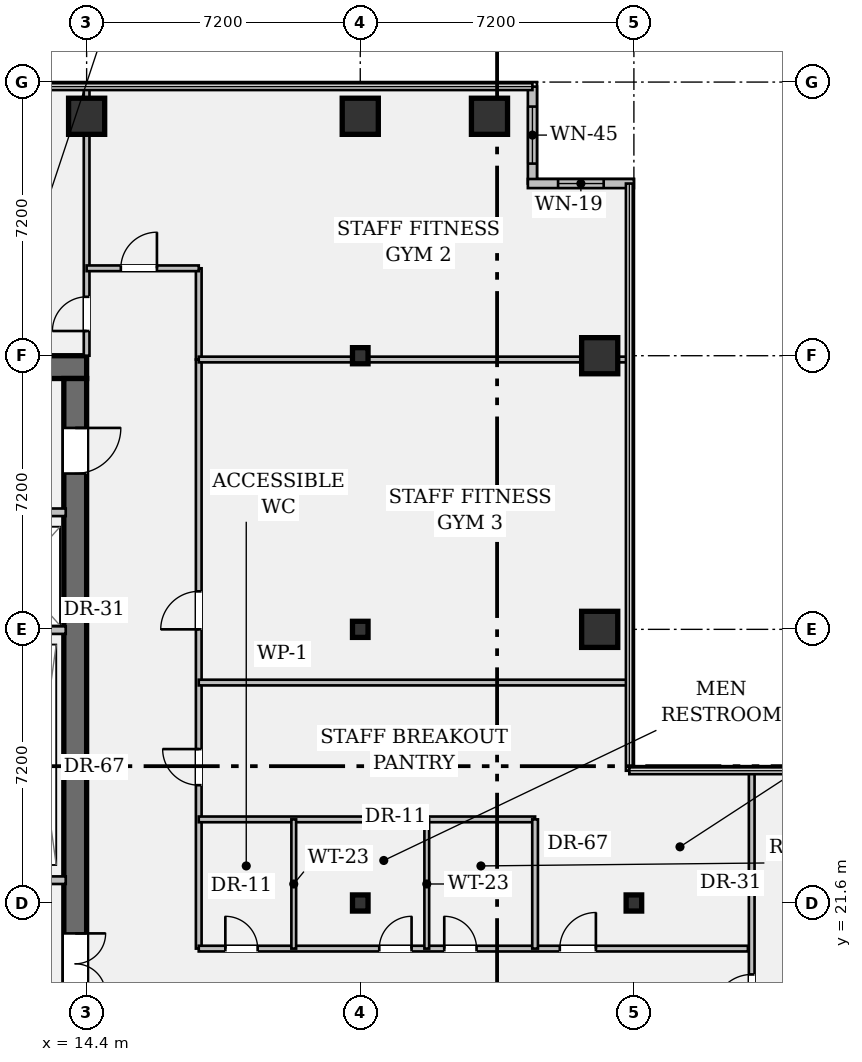
"""IFC4 building model, lengths in metres.
Left out: names, types, materials, properties, quantities, classifications, styles, units other than length and angle.
Written with IfcOpenShell. Run it as: python <this file> out.ifc"""

import sys

from ifc_helpers import new_model, si_unit, direction, frame, frame_2d, origin, origin_2d, place, context, subcontext, project, spatial, rectangle, hollow_rectangle, i_section, extrude, element, fill, save


model = new_model("IFC4")
c1 = context("Model", 3, precision=1e-05, world=origin(), true_north=direction((0.0, 1.0)))
c2 = subcontext(c1, "Body", "Model", "MODEL_VIEW")
j1 = project(units=[si_unit("LENGTHUNIT", "METRE"), si_unit("PLANEANGLEUNIT", "RADIAN")], contexts=[c1])
p1 = place(None, origin())
s1 = spatial("IfcSite", under=j1, at=p1, CompositionType="ELEMENT")
p2 = place(p1, origin())
s2 = spatial("IfcBuilding", under=s1, at=p2, CompositionType="ELEMENT")
p3 = place(p2, frame((0.0, 0.0, 81.2)))
s3 = spatial("IfcBuildingStorey", under=s2, at=p3, CompositionType="ELEMENT", Elevation=81.2)
p4 = place(p3, frame((0.6, 35.7, 0.0), z_axis=(0.0, 0.0, 1.0), x_axis=(1.0, 0.0, 0.0)))
e1 = element("IfcWall", 1, at=p4, inside=s3, PredefinedType="SHEAR", context=c2, shape_type="SweptSolid", body=[
    extrude(rectangle(XDim=13.8, YDim=0.6, at=frame_2d((6.9, 0.0))), origin(), (0.0, 0.0, 1.0), 3.57),
])
p5 = place(p3, frame((14.1, 35.4, 0.0), z_axis=(0.0, 0.0, 1.0), x_axis=(0.0, -1.0, 0.0)))
e2 = element("IfcWall", 2, at=p5, inside=s3, PredefinedType="SHEAR", context=c2, shape_type="SweptSolid", body=[
    extrude(rectangle(XDim=27.6, YDim=0.6, at=frame_2d((13.8, 0.0))), origin(), (0.0, 0.0, 1.0), 3.57),
])
p6 = place(p5, frame((1.3, 0.0, 0.0)))
e3 = element("IfcOpeningElement", 3, at=p6, cuts=e2, PredefinedType="OPENING", context=c2, shape_type="SweptSolid", body=[
    extrude(rectangle(XDim=1.2, YDim=2.15, at=frame_2d((0.6, 1.075))), frame((0.0, 0.312, 0.0), z_axis=(0.0, -1.0, 0.0), x_axis=(1.0, 0.0, 0.0)), (0.0, 0.0, 1.0), 0.624),
])
p7 = place(p5, frame((25.25, 0.0, 0.0)))
e4 = element("IfcOpeningElement", 4, at=p7, cuts=e2, PredefinedType="OPENING", context=c2, shape_type="SweptSolid", body=[
    extrude(rectangle(XDim=1.2, YDim=2.15, at=frame_2d((0.6, 1.075))), frame((0.0, 0.312, 0.0), z_axis=(0.0, -1.0, 0.0), x_axis=(1.0, 0.0, 0.0)), (0.0, 0.0, 1.0), 0.624),
])
p8 = place(p5, frame((14.6, 0.0, 0.0)))
e5 = element("IfcOpeningElement", 5, at=p8, cuts=e2, PredefinedType="OPENING", context=c2, shape_type="SweptSolid", body=[
    extrude(rectangle(XDim=1.6, YDim=2.2, at=frame_2d((0.8, 1.1))), frame((0.0, 0.312, 0.0), z_axis=(0.0, -1.0, 0.0), x_axis=(1.0, 0.0, 0.0)), (0.0, 0.0, 1.0), 0.624),
])
p9 = place(p3, frame((14.4, 42.3, 0.0), z_axis=(0.0, 0.0, 1.0), x_axis=(1.0, 0.0, 0.0)))
e6 = element("IfcColumn", 6, at=p9, inside=s3, PredefinedType="COLUMN", context=c2, shape_type="SweptSolid", body=[
    extrude(hollow_rectangle(XDim=0.95, YDim=0.95, WallThickness=0.06, at=origin_2d()), origin(), (0.0, 0.0, 1.0), 3.57),
])
for number, where, z_axis, x_axis in (
    (7, (21.6, 21.6, 0.0), (0.0, 0.0, 1.0), (1.0, 0.0, 0.0)),
    (8, (21.6, 28.8, 0.0), (0.0, 0.0, 1.0), (1.0, 0.0, 0.0)),
    (9, (21.6, 36.0, 0.0), (0.0, 0.0, 1.0), (1.0, 0.0, 0.0)),
):
    element("IfcColumn", number, at=place(p3, frame(where, z_axis=z_axis, x_axis=x_axis)), inside=s3, PredefinedType="COLUMN", context=c2, shape_type="SweptSolid", body=[
        extrude(i_section(OverallWidth=0.409, OverallDepth=0.424, WebThickness=0.033, FlangeThickness=0.052, FilletRadius=0.018, at=origin_2d()), origin(), (0.0, 0.0, 1.0), 3.57),
    ])
for number, where, z_axis, x_axis in (
    (10, (21.6, 42.3, 0.0), (0.0, 0.0, 1.0), (1.0, 0.0, 0.0)),
    (11, (25.0, 42.3, 0.0), (0.0, 0.0, 1.0), (1.0, 0.0, 0.0)),
    (12, (27.9, 28.8, 0.0), (0.0, 0.0, 1.0), (1.0, 0.0, 0.0)),
    (13, (27.9, 36.0, 0.0), (0.0, 0.0, 1.0), (1.0, 0.0, 0.0)),
):
    element("IfcColumn", number, at=place(p3, frame(where, z_axis=z_axis, x_axis=x_axis)), inside=s3, PredefinedType="COLUMN", context=c2, shape_type="SweptSolid", body=[
        extrude(hollow_rectangle(XDim=0.95, YDim=0.95, WallThickness=0.06, at=origin_2d()), origin(), (0.0, 0.0, 1.0), 3.57),
    ])
p10 = place(p3, frame((28.8, 21.6, 0.0), z_axis=(0.0, 0.0, 1.0), x_axis=(1.0, 0.0, 0.0)))
e14 = element("IfcColumn", 14, at=p10, inside=s3, PredefinedType="COLUMN", context=c2, shape_type="SweptSolid", body=[
    extrude(i_section(OverallWidth=0.409, OverallDepth=0.424, WebThickness=0.033, FlangeThickness=0.052, FilletRadius=0.018, at=origin_2d()), origin(), (0.0, 0.0, 1.0), 3.57),
])
p11 = place(p3, frame((26.13, 43.08, 0.0), z_axis=(0.0, 0.0, 1.0), x_axis=(0.0, -1.0, 0.0)))
e15 = element("IfcWall", 15, at=p11, inside=s3, PredefinedType="STANDARD", context=c2, shape_type="SweptSolid", body=[
    extrude(rectangle(XDim=2.55, YDim=0.24, at=frame_2d((1.275, 0.0))), origin(), (0.0, 0.0, 1.0), 3.57),
])
p12 = place(p11, frame((0.525, 0.0, 0.95)))
e16 = element("IfcOpeningElement", 16, at=p12, cuts=e15, PredefinedType="OPENING", context=c2, shape_type="SweptSolid", body=[
    extrude(rectangle(XDim=1.5, YDim=1.8, at=frame_2d((0.75, 0.9))), frame((0.0, 0.132, 0.0), z_axis=(0.0, -1.0, 0.0), x_axis=(1.0, 0.0, 0.0)), (0.0, 0.0, 1.0), 0.264),
])
p13 = place(p3, frame((26.01, 40.53, 0.0), z_axis=(0.0, 0.0, 1.0), x_axis=(1.0, 0.0, 0.0)))
e17 = element("IfcWall", 17, at=p13, inside=s3, PredefinedType="STANDARD", context=c2, shape_type="SweptSolid", body=[
    extrude(rectangle(XDim=2.79, YDim=0.24, at=frame_2d((1.395, 0.0))), origin(), (0.0, 0.0, 1.0), 3.57),
])
p14 = place(p13, frame((0.795, 0.0, 0.95)))
e18 = element("IfcOpeningElement", 18, at=p14, cuts=e17, PredefinedType="OPENING", context=c2, shape_type="SweptSolid", body=[
    extrude(rectangle(XDim=1.2, YDim=1.8, at=frame_2d((0.6, 0.9))), frame((0.0, 0.132, 0.0), z_axis=(0.0, -1.0, 0.0), x_axis=(1.0, 0.0, 0.0)), (0.0, 0.0, 1.0), 0.264),
])
p15 = place(p3, frame((8.7, 31.88, 0.0), z_axis=(0.0, 0.0, 1.0), x_axis=(1.0, 0.0, 0.0)))
e19 = element("IfcWall", 19, at=p15, inside=s3, PredefinedType="PARTITIONING", context=c2, shape_type="SweptSolid", body=[
    extrude(rectangle(XDim=5.15, YDim=0.2, at=frame_2d((2.575, 0.0))), origin(), (0.0, 0.0, 1.0), 3.57),
])
p16 = place(p15, frame((0.75, 0.0, 0.0)))
e20 = element("IfcOpeningElement", 20, at=p16, cuts=e19, PredefinedType="OPENING", context=c2, shape_type="SweptSolid", body=[
    extrude(rectangle(XDim=1.2, YDim=2.2, at=frame_2d((0.6, 1.1))), frame((0.0, 0.112, 0.0), z_axis=(0.0, -1.0, 0.0), x_axis=(1.0, 0.0, 0.0)), (0.0, 0.0, 1.0), 0.224),
])
p17 = place(p15, frame((3.25, 0.0, 0.0)))
e21 = element("IfcOpeningElement", 21, at=p17, cuts=e19, PredefinedType="OPENING", context=c2, shape_type="SweptSolid", body=[
    extrude(rectangle(XDim=1.2, YDim=2.2, at=frame_2d((0.6, 1.1))), frame((0.0, 0.112, 0.0), z_axis=(0.0, -1.0, 0.0), x_axis=(1.0, 0.0, 0.0)), (0.0, 0.0, 1.0), 0.224),
])
p18 = place(p3, frame((8.7, 28.78, 0.0), z_axis=(0.0, 0.0, 1.0), x_axis=(1.0, 0.0, 0.0)))
e22 = element("IfcWall", 22, at=p18, inside=s3, PredefinedType="PARTITIONING", context=c2, shape_type="SweptSolid", body=[
    extrude(rectangle(XDim=5.15, YDim=0.2, at=frame_2d((2.575, 0.0))), origin(), (0.0, 0.0, 1.0), 3.57),
])
p19 = place(p3, frame((7.1, 22.2, 0.0), z_axis=(0.0, 0.0, 1.0), x_axis=(1.0, 0.0, 0.0)))
e23 = element("IfcWall", 23, at=p19, inside=s3, PredefinedType="PARTITIONING", context=c2, shape_type="SweptSolid", body=[
    extrude(rectangle(XDim=6.75, YDim=0.2, at=frame_2d((3.375, 0.0))), origin(), (0.0, 0.0, 1.0), 3.57),
])
p20 = place(p3, frame((17.35, 20.4, 0.0), z_axis=(0.0, 0.0, 1.0), x_axis=(0.0, 1.0, 0.0)))
e24 = element("IfcWall", 24, at=p20, inside=s3, PredefinedType="PARTITIONING", context=c2, shape_type="SweptSolid", body=[
    extrude(rectangle(XDim=15.5, YDim=0.15, at=frame_2d((7.75, 0.0))), origin(), (0.0, 0.0, 1.0), 2.783),
])
p21 = place(p20, frame((4.3, 0.0, 0.0)))
e25 = element("IfcOpeningElement", 25, at=p21, cuts=e24, PredefinedType="OPENING", context=c2, shape_type="SweptSolid", body=[
    extrude(rectangle(XDim=0.95, YDim=2.15, at=frame_2d((0.475, 1.075))), frame((0.0, 0.087, 0.0), z_axis=(0.0, -1.0, 0.0), x_axis=(1.0, 0.0, 0.0)), (0.0, 0.0, 1.0), 0.174),
])
p22 = place(p20, frame((8.4, 0.0, 0.0)))
e26 = element("IfcOpeningElement", 26, at=p22, cuts=e24, PredefinedType="OPENING", context=c2, shape_type="SweptSolid", body=[
    extrude(rectangle(XDim=1.0, YDim=2.15, at=frame_2d((0.5, 1.075))), frame((0.0, 0.087, 0.0), z_axis=(0.0, -1.0, 0.0), x_axis=(1.0, 0.0, 0.0)), (0.0, 0.0, 1.0), 0.174),
])
p23 = place(p3, frame((17.35, 20.4, 0.0), z_axis=(0.0, 0.0, 1.0), x_axis=(1.0, 0.0, 0.0)))
e27 = element("IfcWall", 27, at=p23, inside=s3, PredefinedType="PARTITIONING", context=c2, shape_type="SweptSolid", body=[
    extrude(rectangle(XDim=14.45, YDim=0.15, at=frame_2d((7.225, 0.0))), origin(), (0.0, 0.0, 1.0), 2.783),
])
p24 = place(p23, frame((0.7, 0.0, 0.0)))
e28 = element("IfcOpeningElement", 28, at=p24, cuts=e27, PredefinedType="OPENING", context=c2, shape_type="SweptSolid", body=[
    extrude(rectangle(XDim=0.85, YDim=2.15, at=frame_2d((0.425, 1.075))), frame((0.0, 0.087, 0.0), z_axis=(0.0, -1.0, 0.0), x_axis=(1.0, 0.0, 0.0)), (0.0, 0.0, 1.0), 0.174),
])
p25 = place(p23, frame((4.75, 0.0, 0.0)))
e29 = element("IfcOpeningElement", 29, at=p25, cuts=e27, PredefinedType="OPENING", context=c2, shape_type="SweptSolid", body=[
    extrude(rectangle(XDim=0.85, YDim=2.15, at=frame_2d((0.425, 1.075))), frame((0.0, 0.087, 0.0), z_axis=(0.0, -1.0, 0.0), x_axis=(1.0, 0.0, 0.0)), (0.0, 0.0, 1.0), 0.174),
])
p26 = place(p23, frame((6.46, 0.0, 0.0)))
e30 = element("IfcOpeningElement", 30, at=p26, cuts=e27, PredefinedType="OPENING", context=c2, shape_type="SweptSolid", body=[
    extrude(rectangle(XDim=0.85, YDim=2.15, at=frame_2d((0.425, 1.075))), frame((0.0, 0.087, 0.0), z_axis=(0.0, -1.0, 0.0), x_axis=(1.0, 0.0, 0.0)), (0.0, 0.0, 1.0), 0.174),
])
p27 = place(p23, frame((9.5, 0.0, 0.0)))
e31 = element("IfcOpeningElement", 31, at=p27, cuts=e27, PredefinedType="OPENING", context=c2, shape_type="SweptSolid", body=[
    extrude(rectangle(XDim=0.95, YDim=2.15, at=frame_2d((0.475, 1.075))), frame((0.0, 0.087, 0.0), z_axis=(0.0, -1.0, 0.0), x_axis=(1.0, 0.0, 0.0)), (0.0, 0.0, 1.0), 0.174),
])
p28 = place(p3, frame((31.9, 0.12, 0.0), z_axis=(0.0, 0.0, 1.0), x_axis=(0.0, 1.0, 0.0)))
e32 = element("IfcWall", 32, at=p28, inside=s3, PredefinedType="PARTITIONING", context=c2, shape_type="SweptSolid", body=[
    extrude(rectangle(XDim=24.96, YDim=0.15, at=frame_2d((12.48, 0.0))), origin(), (0.0, 0.0, 1.0), 2.783),
])
p29 = place(p28, frame((18.6, 0.0, 0.0)))
e33 = element("IfcOpeningElement", 33, at=p29, cuts=e32, PredefinedType="OPENING", context=c2, shape_type="SweptSolid", body=[
    extrude(rectangle(XDim=1.0, YDim=2.15, at=frame_2d((0.5, 1.075))), frame((0.0, 0.087, 0.0), z_axis=(0.0, -1.0, 0.0), x_axis=(1.0, 0.0, 0.0)), (0.0, 0.0, 1.0), 0.174),
])
p30 = place(p3, frame((14.4, 36.0, 0.0), z_axis=(0.0, 0.0, 1.0), x_axis=(0.0, 1.0, 0.0)))
e34 = element("IfcWall", 34, at=p30, inside=s3, PredefinedType="PARTITIONING", context=c2, shape_type="SweptSolid", body=[
    extrude(rectangle(XDim=7.08, YDim=0.15, at=frame_2d((3.54, 0.0))), origin(), (0.0, 0.0, 1.0), 2.783),
])
p31 = place(p30, frame((0.65, 0.0, 0.0)))
e35 = element("IfcOpeningElement", 35, at=p31, cuts=e34, PredefinedType="OPENING", context=c2, shape_type="SweptSolid", body=[
    extrude(rectangle(XDim=0.9, YDim=2.15, at=frame_2d((0.45, 1.075))), frame((0.0, 0.087, 0.0), z_axis=(0.0, -1.0, 0.0), x_axis=(1.0, 0.0, 0.0)), (0.0, 0.0, 1.0), 0.174),
])
p32 = place(p3, frame((17.35, 35.9, 0.0), z_axis=(0.0, 0.0, 1.0), x_axis=(0.0, 1.0, 0.0)))
e36 = element("IfcWall", 36, at=p32, inside=s3, PredefinedType="PARTITIONING", context=c2, shape_type="SweptSolid", body=[
    extrude(rectangle(XDim=2.4, YDim=0.15, at=frame_2d((1.2, 0.0))), origin(), (0.0, 0.0, 1.0), 2.783),
])
p33 = place(p3, frame((14.4, 38.3, 0.0), z_axis=(0.0, 0.0, 1.0), x_axis=(1.0, 0.0, 0.0)))
e37 = element("IfcWall", 37, at=p33, inside=s3, PredefinedType="PARTITIONING", context=c2, shape_type="SweptSolid", body=[
    extrude(rectangle(XDim=2.95, YDim=0.15, at=frame_2d((1.475, 0.0))), origin(), (0.0, 0.0, 1.0), 2.783),
])
p34 = place(p33, frame((0.9, 0.0, 0.0)))
e38 = element("IfcOpeningElement", 38, at=p34, cuts=e37, PredefinedType="OPENING", context=c2, shape_type="SweptSolid", body=[
    extrude(rectangle(XDim=0.95, YDim=2.15, at=frame_2d((0.475, 1.075))), frame((0.0, 0.087, 0.0), z_axis=(0.0, -1.0, 0.0), x_axis=(1.0, 0.0, 0.0)), (0.0, 0.0, 1.0), 0.174),
])
p35 = place(p3, frame((17.35, 35.9, 0.0), z_axis=(0.0, 0.0, 1.0), x_axis=(1.0, 0.0, 0.0)))
e39 = element("IfcWall", 39, at=p35, inside=s3, PredefinedType="PARTITIONING", context=c2, shape_type="SweptSolid", body=[
    extrude(rectangle(XDim=11.33, YDim=0.15, at=frame_2d((5.665, 0.0))), origin(), (0.0, 0.0, 1.0), 2.783),
])
p36 = place(p3, frame((17.35, 23.8, 0.0), z_axis=(0.0, 0.0, 1.0), x_axis=(1.0, 0.0, 0.0)))
e40 = element("IfcWall", 40, at=p36, inside=s3, PredefinedType="PARTITIONING", context=c2, shape_type="SweptSolid", body=[
    extrude(rectangle(XDim=8.85, YDim=0.15, at=frame_2d((4.425, 0.0))), origin(), (0.0, 0.0, 1.0), 2.783),
])
p37 = place(p3, frame((26.2, 20.4, 0.0), z_axis=(0.0, 0.0, 1.0), x_axis=(0.0, 1.0, 0.0)))
e41 = element("IfcWall", 41, at=p37, inside=s3, PredefinedType="PARTITIONING", context=c2, shape_type="SweptSolid", body=[
    extrude(rectangle(XDim=3.4, YDim=0.15, at=frame_2d((1.7, 0.0))), origin(), (0.0, 0.0, 1.0), 2.783),
])
for number, where, z_axis, x_axis in (
    (42, (19.85, 20.4, 0.0), (0.0, 0.0, 1.0), (0.0, 1.0, 0.0)),
    (43, (23.35, 20.4, 0.0), (0.0, 0.0, 1.0), (0.0, 1.0, 0.0)),
):
    element("IfcWall", number, at=place(p3, frame(where, z_axis=z_axis, x_axis=x_axis)), inside=s3, PredefinedType="PARTITIONING", context=c2, shape_type="SweptSolid", body=[
        extrude(rectangle(XDim=3.4, YDim=0.125, at=frame_2d((1.7, 0.0))), origin(), (0.0, 0.0, 1.0), 2.783),
    ])
p38 = place(p3, frame((17.35, 27.4, 0.0), z_axis=(0.0, 0.0, 1.0), x_axis=(1.0, 0.0, 0.0)))
e44 = element("IfcWall", 44, at=p38, inside=s3, PredefinedType="PARTITIONING", context=c2, shape_type="SweptSolid", body=[
    extrude(rectangle(XDim=11.33, YDim=0.15, at=frame_2d((5.665, 0.0))), origin(), (0.0, 0.0, 1.0), 2.783),
])
p39 = place(p12, origin())
e45 = element("IfcWindow", 45, at=p39, inside=s3, PartitioningType="SINGLE_PANEL", PredefinedType="WINDOW", context=c2, shape_type="SweptSolid", body=[
    extrude(rectangle(XDim=1.5, YDim=1.8, at=frame_2d((0.75, 0.9))), frame((0.0, 0.03, 0.0), z_axis=(0.0, -1.0, 0.0), x_axis=(1.0, 0.0, 0.0)), (0.0, 0.0, 1.0), 0.06),
])
fill(e16, e45)
p40 = place(p14, origin())
e46 = element("IfcWindow", 46, at=p40, inside=s3, PartitioningType="SINGLE_PANEL", PredefinedType="WINDOW", context=c2, shape_type="SweptSolid", body=[
    extrude(rectangle(XDim=1.2, YDim=1.8, at=frame_2d((0.6, 0.9))), frame((0.0, 0.03, 0.0), z_axis=(0.0, -1.0, 0.0), x_axis=(1.0, 0.0, 0.0)), (0.0, 0.0, 1.0), 0.06),
])
fill(e18, e46)
p41 = place(p6, origin())
e47 = element("IfcDoor", 47, at=p41, inside=s3, OperationType="SINGLE_SWING_LEFT", PredefinedType="DOOR", context=c2, shape_type="SweptSolid", body=[
    extrude(rectangle(XDim=1.2, YDim=2.15, at=frame_2d((0.6, 1.075))), frame((0.0, 0.025, 0.0), z_axis=(0.0, -1.0, 0.0), x_axis=(1.0, 0.0, 0.0)), (0.0, 0.0, 1.0), 0.05),
])
fill(e3, e47)
p42 = place(p8, origin())
e48 = element("IfcDoor", 48, at=p42, inside=s3, OperationType="DOUBLE_DOOR_SINGLE_SWING", PredefinedType="DOOR", context=c2, shape_type="SweptSolid", body=[
    extrude(rectangle(XDim=1.6, YDim=2.2, at=frame_2d((0.8, 1.1))), frame((0.0, 0.025, 0.0), z_axis=(0.0, -1.0, 0.0), x_axis=(1.0, 0.0, 0.0)), (0.0, 0.0, 1.0), 0.05),
])
fill(e5, e48)
p43 = place(p31, origin())
e49 = element("IfcDoor", 49, at=p43, inside=s3, OperationType="SINGLE_SWING_LEFT", PredefinedType="DOOR", context=c2, shape_type="SweptSolid", body=[
    extrude(rectangle(XDim=0.9, YDim=2.15, at=frame_2d((0.45, 1.075))), frame((0.0, 0.025, 0.0), z_axis=(0.0, -1.0, 0.0), x_axis=(1.0, 0.0, 0.0)), (0.0, 0.0, 1.0), 0.05),
])
fill(e35, e49)
p44 = place(p34, origin())
e50 = element("IfcDoor", 50, at=p44, inside=s3, OperationType="SINGLE_SWING_RIGHT", PredefinedType="DOOR", context=c2, shape_type="SweptSolid", body=[
    extrude(rectangle(XDim=0.95, YDim=2.15, at=frame_2d((0.475, 1.075))), frame((0.0, 0.025, 0.0), z_axis=(0.0, -1.0, 0.0), x_axis=(1.0, 0.0, 0.0)), (0.0, 0.0, 1.0), 0.05),
])
fill(e38, e50)
p45 = place(p24, origin())
e51 = element("IfcDoor", 51, at=p45, inside=s3, OperationType="SINGLE_SWING_LEFT", PredefinedType="DOOR", context=c2, shape_type="SweptSolid", body=[
    extrude(rectangle(XDim=0.85, YDim=2.15, at=frame_2d((0.425, 1.075))), frame((0.0, 0.025, 0.0), z_axis=(0.0, -1.0, 0.0), x_axis=(1.0, 0.0, 0.0)), (0.0, 0.0, 1.0), 0.05),
])
fill(e28, e51)
p46 = place(p25, origin())
e52 = element("IfcDoor", 52, at=p46, inside=s3, OperationType="SINGLE_SWING_RIGHT", PredefinedType="DOOR", context=c2, shape_type="SweptSolid", body=[
    extrude(rectangle(XDim=0.85, YDim=2.15, at=frame_2d((0.425, 1.075))), frame((0.0, 0.025, 0.0), z_axis=(0.0, -1.0, 0.0), x_axis=(1.0, 0.0, 0.0)), (0.0, 0.0, 1.0), 0.05),
])
fill(e29, e52)
p47 = place(p26, origin())
e53 = element("IfcDoor", 53, at=p47, inside=s3, OperationType="SINGLE_SWING_LEFT", PredefinedType="DOOR", context=c2, shape_type="SweptSolid", body=[
    extrude(rectangle(XDim=0.85, YDim=2.15, at=frame_2d((0.425, 1.075))), frame((0.0, 0.025, 0.0), z_axis=(0.0, -1.0, 0.0), x_axis=(1.0, 0.0, 0.0)), (0.0, 0.0, 1.0), 0.05),
])
fill(e30, e53)
p48 = place(p21, origin())
e54 = element("IfcDoor", 54, at=p48, inside=s3, OperationType="SINGLE_SWING_RIGHT", PredefinedType="DOOR", context=c2, shape_type="SweptSolid", body=[
    extrude(rectangle(XDim=0.95, YDim=2.15, at=frame_2d((0.475, 1.075))), frame((0.0, 0.025, 0.0), z_axis=(0.0, -1.0, 0.0), x_axis=(1.0, 0.0, 0.0)), (0.0, 0.0, 1.0), 0.05),
])
fill(e25, e54)
p49 = place(p22, origin())
e55 = element("IfcDoor", 55, at=p49, inside=s3, OperationType="SINGLE_SWING_LEFT", PredefinedType="DOOR", context=c2, shape_type="SweptSolid", body=[
    extrude(rectangle(XDim=1.0, YDim=2.15, at=frame_2d((0.5, 1.075))), frame((0.0, 0.025, 0.0), z_axis=(0.0, -1.0, 0.0), x_axis=(1.0, 0.0, 0.0)), (0.0, 0.0, 1.0), 0.05),
])
fill(e26, e55)
p50 = place(p27, origin())
e56 = element("IfcDoor", 56, at=p50, inside=s3, OperationType="SINGLE_SWING_RIGHT", PredefinedType="DOOR", context=c2, shape_type="SweptSolid", body=[
    extrude(rectangle(XDim=0.95, YDim=2.15, at=frame_2d((0.475, 1.075))), frame((0.0, 0.025, 0.0), z_axis=(0.0, -1.0, 0.0), x_axis=(1.0, 0.0, 0.0)), (0.0, 0.0, 1.0), 0.05),
])
fill(e31, e56)
p51 = place(p29, origin())
e57 = element("IfcDoor", 57, at=p51, inside=s3, OperationType="SINGLE_SWING_LEFT", PredefinedType="DOOR", context=c2, shape_type="SweptSolid", body=[
    extrude(rectangle(XDim=1.0, YDim=2.15, at=frame_2d((0.5, 1.075))), frame((0.0, 0.025, 0.0), z_axis=(0.0, -1.0, 0.0), x_axis=(1.0, 0.0, 0.0)), (0.0, 0.0, 1.0), 0.05),
])
fill(e33, e57)
save(model, sys.argv[1])
